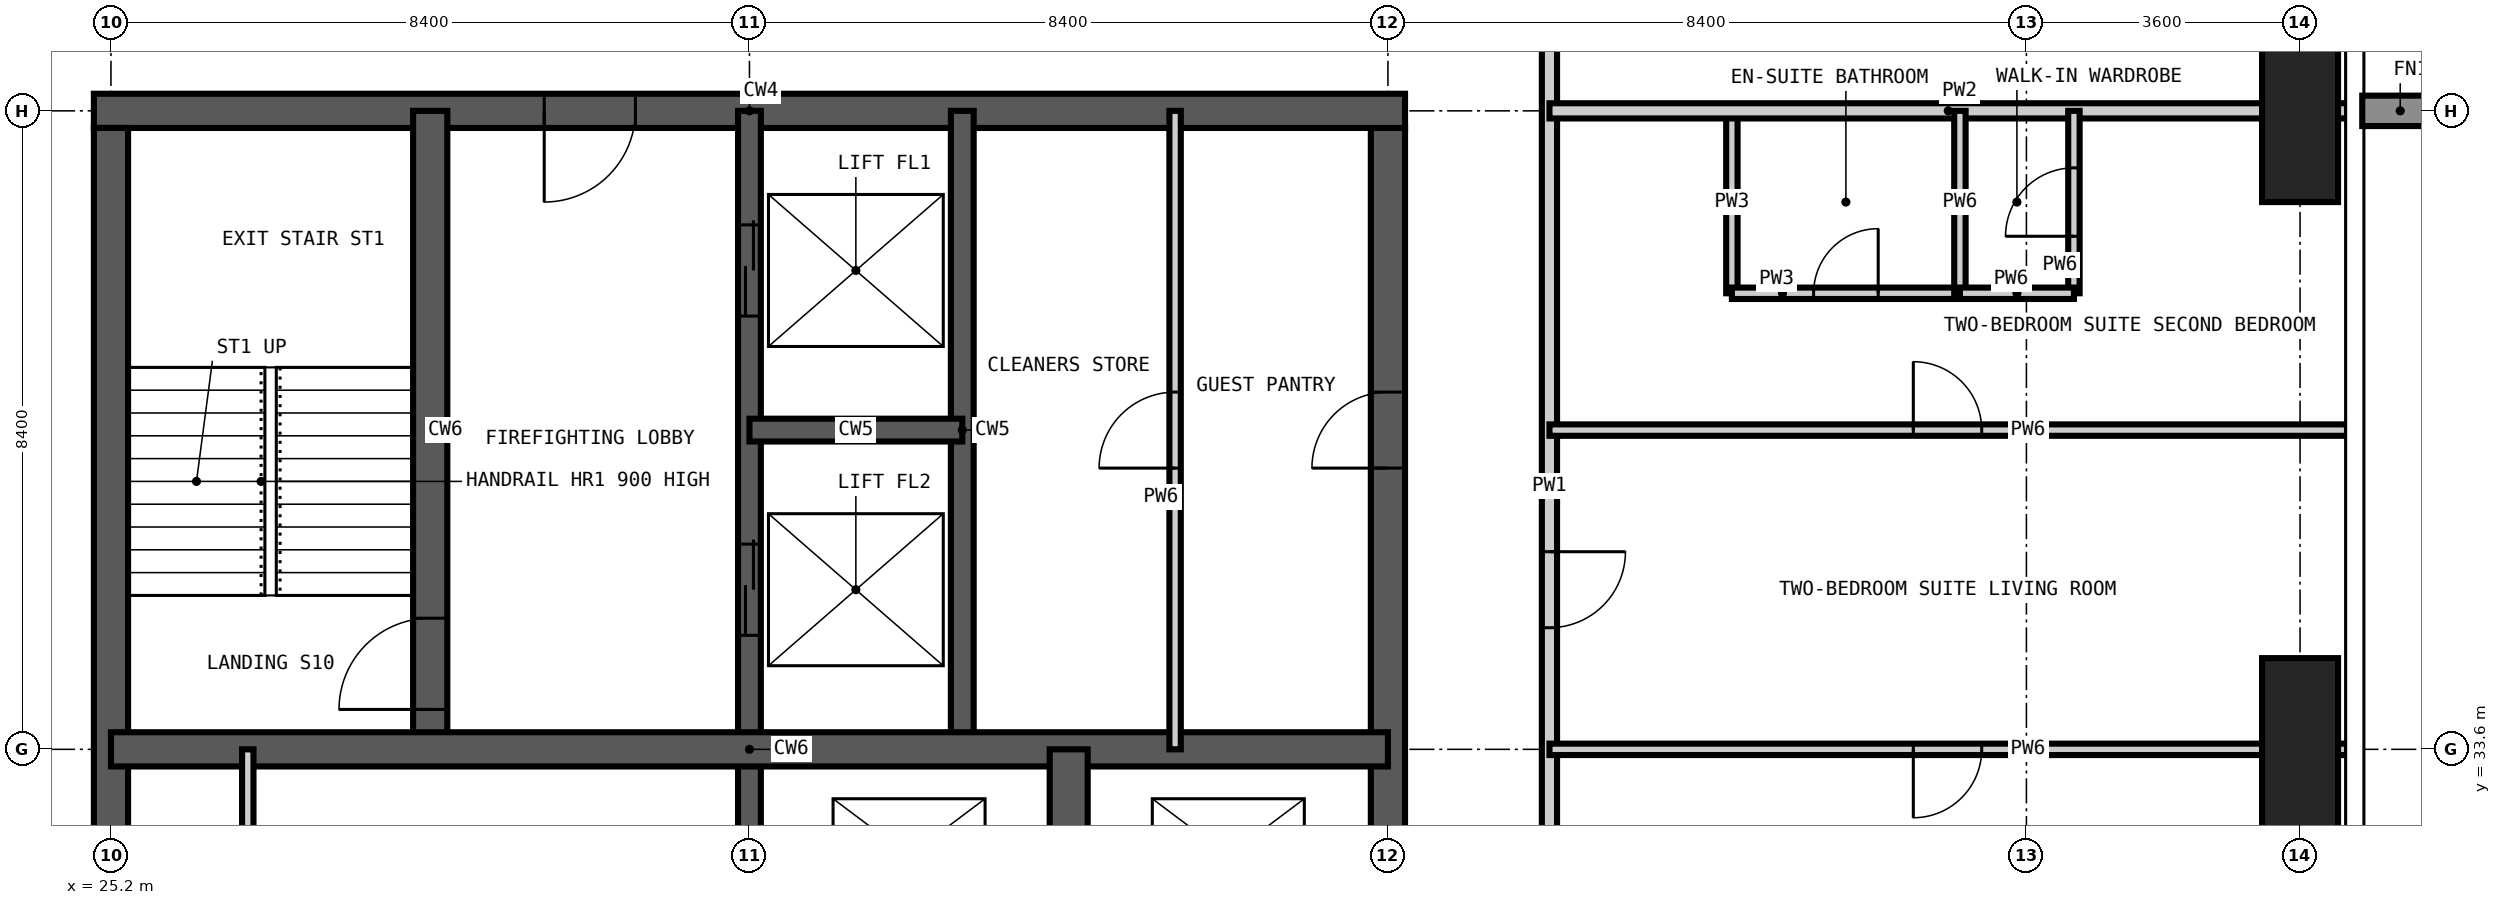
"""IFC4 building model, lengths in metres.
Left out: names, types, materials, properties, quantities, classifications, styles, units other than length and angle.
Written with IfcOpenShell. Run it as: python <this file> out.ifc"""

import sys

from ifc_helpers import new_model, si_unit, direction, frame, frame_2d, origin, origin_2d, place, context, subcontext, project, spatial, rectangle, extrude, element, fill, save


model = new_model("IFC4")
c1 = context("Model", 3, precision=1e-05, world=origin(), true_north=direction((0.0, 1.0)))
c2 = subcontext(c1, "Body", "Model", "MODEL_VIEW")
j1 = project(units=[si_unit("LENGTHUNIT", "METRE"), si_unit("PLANEANGLEUNIT", "RADIAN")], contexts=[c1])
p1 = place(None, origin())
s1 = spatial("IfcSite", under=j1, at=p1, CompositionType="ELEMENT")
p2 = place(p1, origin())
s2 = spatial("IfcBuilding", under=s1, at=p2, CompositionType="ELEMENT")
p3 = place(p2, frame((0.0, 0.0, 276.3)))
s3 = spatial("IfcBuildingStorey", under=s2, at=p3, CompositionType="ELEMENT", Elevation=276.3)
for number, where, z_axis, x_axis in (
    (1, (54.0, 33.6, -0.35), (0.0, 0.0, 1.0), (1.0, 0.0, 0.0)),
    (2, (54.0, 42.0, -0.35), (0.0, 0.0, 1.0), (1.0, 0.0, 0.0)),
):
    element("IfcColumn", number, at=place(p3, frame(where, z_axis=z_axis, x_axis=x_axis)), inside=s3, PredefinedType="COLUMN", context=c2, shape_type="SweptSolid", body=[
        extrude(rectangle(XDim=1.0, YDim=2.4, at=origin_2d()), origin(), (0.0, 0.0, 1.0), 3.9),
    ])
p4 = place(p3, frame((42.0, 17.025, -0.35), z_axis=(0.0, 0.0, 1.0), x_axis=(0.0, 1.0, 0.0)))
e3 = element("IfcWall", 3, at=p4, inside=s3, PredefinedType="SHEAR", context=c2, shape_type="SweptSolid", body=[
    extrude(rectangle(XDim=24.75, YDim=0.45, at=frame_2d((12.375, 0.0))), origin(), (0.0, 0.0, 1.0), 3.9),
])
p5 = place(p4, frame((0.575, 0.0, 0.35)))
e4 = element("IfcOpeningElement", 4, at=p5, cuts=e3, PredefinedType="OPENING", context=c2, shape_type="SweptSolid", body=[
    extrude(rectangle(XDim=1.2, YDim=2.2, at=frame_2d((0.6, 1.1))), frame((0.0, 0.235, 0.0), z_axis=(0.0, -1.0, 0.0), x_axis=(1.0, 0.0, 0.0)), (0.0, 0.0, 1.0), 0.47),
])
p6 = place(p4, frame((11.475, 0.0, 0.35)))
e5 = element("IfcOpeningElement", 5, at=p6, cuts=e3, PredefinedType="OPENING", context=c2, shape_type="SweptSolid", body=[
    extrude(rectangle(XDim=1.8, YDim=2.2, at=frame_2d((0.9, 1.1))), frame((0.0, 0.235, 0.0), z_axis=(0.0, -1.0, 0.0), x_axis=(1.0, 0.0, 0.0)), (0.0, 0.0, 1.0), 0.47),
])
p7 = place(p4, frame((20.275, 0.0, 0.35)))
e6 = element("IfcOpeningElement", 6, at=p7, cuts=e3, PredefinedType="OPENING", context=c2, shape_type="SweptSolid", body=[
    extrude(rectangle(XDim=1.0, YDim=2.1, at=frame_2d((0.5, 1.05))), frame((0.0, 0.235, 0.0), z_axis=(0.0, -1.0, 0.0), x_axis=(1.0, 0.0, 0.0)), (0.0, 0.0, 1.0), 0.47),
])
p8 = place(p3, frame((42.225, 42.0, -0.35), z_axis=(0.0, 0.0, 1.0), x_axis=(-1.0, 0.0, 0.0)))
e7 = element("IfcWall", 7, at=p8, inside=s3, PredefinedType="SHEAR", context=c2, shape_type="SweptSolid", body=[
    extrude(rectangle(XDim=17.25, YDim=0.45, at=frame_2d((8.625, 0.0))), origin(), (0.0, 0.0, 1.0), 3.9),
])
p9 = place(p8, frame((10.125, 0.0, 0.35)))
e8 = element("IfcOpeningElement", 8, at=p9, cuts=e7, PredefinedType="OPENING", context=c2, shape_type="SweptSolid", body=[
    extrude(rectangle(XDim=1.2, YDim=2.2, at=frame_2d((0.6, 1.1))), frame((0.0, 0.235, 0.0), z_axis=(0.0, -1.0, 0.0), x_axis=(1.0, 0.0, 0.0)), (0.0, 0.0, 1.0), 0.47),
])
p10 = place(p3, frame((25.2, 41.775, -0.35), z_axis=(0.0, 0.0, 1.0), x_axis=(0.0, -1.0, 0.0)))
e9 = element("IfcWall", 9, at=p10, inside=s3, PredefinedType="SHEAR", context=c2, shape_type="SweptSolid", body=[
    extrude(rectangle(XDim=24.75, YDim=0.45, at=frame_2d((12.375, 0.0))), origin(), (0.0, 0.0, 1.0), 3.9),
])
p11 = place(p10, frame((11.875, 0.0, 0.35)))
e10 = element("IfcOpeningElement", 10, at=p11, cuts=e9, PredefinedType="OPENING", context=c2, shape_type="SweptSolid", body=[
    extrude(rectangle(XDim=1.0, YDim=2.1, at=frame_2d((0.5, 1.05))), frame((0.0, 0.235, 0.0), z_axis=(0.0, -1.0, 0.0), x_axis=(1.0, 0.0, 0.0)), (0.0, 0.0, 1.0), 0.47),
])
p12 = place(p3, frame((33.6, 16.8, -0.35), z_axis=(0.0, 0.0, 1.0), x_axis=(0.0, 1.0, 0.0)))
e11 = element("IfcWall", 11, at=p12, inside=s3, PredefinedType="SHEAR", context=c2, shape_type="SweptSolid", body=[
    extrude(rectangle(XDim=25.2, YDim=0.3, at=frame_2d((12.6, 0.0))), origin(), (0.0, 0.0, 1.0), 3.9),
])
p13 = place(p12, frame((22.5, 0.0, 0.35)))
e12 = element("IfcOpeningElement", 12, at=p13, cuts=e11, PredefinedType="OPENING", context=c2, shape_type="SweptSolid", body=[
    extrude(rectangle(XDim=1.2, YDim=2.2, at=frame_2d((0.6, 1.1))), frame((0.0, 0.16, 0.0), z_axis=(0.0, -1.0, 0.0), x_axis=(1.0, 0.0, 0.0)), (0.0, 0.0, 1.0), 0.32),
])
p14 = place(p12, frame((18.3, 0.0, 0.35)))
e13 = element("IfcOpeningElement", 13, at=p14, cuts=e11, PredefinedType="OPENING", context=c2, shape_type="SweptSolid", body=[
    extrude(rectangle(XDim=1.2, YDim=2.2, at=frame_2d((0.6, 1.1))), frame((0.0, 0.16, 0.0), z_axis=(0.0, -1.0, 0.0), x_axis=(1.0, 0.0, 0.0)), (0.0, 0.0, 1.0), 0.32),
])
p15 = place(p12, frame((9.3, 0.0, 0.35)))
e14 = element("IfcOpeningElement", 14, at=p15, cuts=e11, PredefinedType="OPENING", context=c2, shape_type="SweptSolid", body=[
    extrude(rectangle(XDim=1.0, YDim=2.1, at=frame_2d((0.5, 1.05))), frame((0.0, 0.16, 0.0), z_axis=(0.0, -1.0, 0.0), x_axis=(1.0, 0.0, 0.0)), (0.0, 0.0, 1.0), 0.32),
])
p16 = place(p3, frame((36.4, 33.6, -0.35), z_axis=(0.0, 0.0, 1.0), x_axis=(0.0, 1.0, 0.0)))
e15 = element("IfcWall", 15, at=p16, inside=s3, PredefinedType="SHEAR", context=c2, shape_type="SweptSolid", body=[
    extrude(rectangle(XDim=8.4, YDim=0.3, at=frame_2d((4.2, 0.0))), origin(), (0.0, 0.0, 1.0), 3.9),
])
p17 = place(p3, frame((33.6, 37.8, -0.35), z_axis=(0.0, 0.0, 1.0), x_axis=(1.0, 0.0, 0.0)))
e16 = element("IfcWall", 16, at=p17, inside=s3, PredefinedType="SHEAR", context=c2, shape_type="SweptSolid", body=[
    extrude(rectangle(XDim=2.8, YDim=0.3, at=frame_2d((1.4, 0.0))), origin(), (0.0, 0.0, 1.0), 3.9),
])
p18 = place(p3, frame((29.4, 33.6, -0.35), z_axis=(0.0, 0.0, 1.0), x_axis=(0.0, 1.0, 0.0)))
e17 = element("IfcWall", 17, at=p18, inside=s3, PredefinedType="SHEAR", context=c2, shape_type="SweptSolid", body=[
    extrude(rectangle(XDim=8.4, YDim=0.45, at=frame_2d((4.2, 0.0))), origin(), (0.0, 0.0, 1.0), 3.9),
])
p19 = place(p18, frame((0.525, 0.0, 0.35)))
e18 = element("IfcOpeningElement", 18, at=p19, cuts=e17, PredefinedType="OPENING", context=c2, shape_type="SweptSolid", body=[
    extrude(rectangle(XDim=1.2, YDim=2.2, at=frame_2d((0.6, 1.1))), frame((0.0, 0.235, 0.0), z_axis=(0.0, -1.0, 0.0), x_axis=(1.0, 0.0, 0.0)), (0.0, 0.0, 1.0), 0.47),
])
p20 = place(p3, frame((25.2, 33.6, -0.35), z_axis=(0.0, 0.0, 1.0), x_axis=(1.0, 0.0, 0.0)))
e19 = element("IfcWall", 19, at=p20, inside=s3, PredefinedType="SHEAR", context=c2, shape_type="SweptSolid", body=[
    extrude(rectangle(XDim=16.8, YDim=0.45, at=frame_2d((8.4, 0.0))), origin(), (0.0, 0.0, 1.0), 3.9),
])
p21 = place(p3, frame((37.8, 30.8, -0.35), z_axis=(0.0, 0.0, 1.0), x_axis=(0.0, 1.0, 0.0)))
e20 = element("IfcWall", 20, at=p21, inside=s3, PredefinedType="SHEAR", context=c2, shape_type="SweptSolid", body=[
    extrude(rectangle(XDim=2.8, YDim=0.5, at=frame_2d((1.4, 0.0))), origin(), (0.0, 0.0, 1.0), 3.9),
])
p22 = place(p3, frame((46.525, 39.6, 0.0), z_axis=(0.0, 0.0, 1.0), x_axis=(0.0, 1.0, 0.0)))
e21 = element("IfcWall", 21, at=p22, inside=s3, PredefinedType="PARTITIONING", context=c2, shape_type="SweptSolid", body=[
    extrude(rectangle(XDim=2.4, YDim=0.15, at=frame_2d((1.2, 0.0))), origin(), (0.0, 0.0, 1.0), 3.55),
])
p23 = place(p3, frame((46.525, 39.6, 0.0), z_axis=(0.0, 0.0, 1.0), x_axis=(1.0, 0.0, 0.0)))
e22 = element("IfcWall", 22, at=p23, inside=s3, PredefinedType="PARTITIONING", context=c2, shape_type="SweptSolid", body=[
    extrude(rectangle(XDim=3.0, YDim=0.15, at=frame_2d((1.5, 0.0))), origin(), (0.0, 0.0, 1.0), 3.55),
])
p24 = place(p23, frame((1.075, 0.0, 0.0)))
e23 = element("IfcOpeningElement", 23, at=p24, cuts=e22, PredefinedType="OPENING", context=c2, shape_type="SweptSolid", body=[
    extrude(rectangle(XDim=0.85, YDim=2.1, at=frame_2d((0.425, 1.05))), frame((0.0, 0.085, 0.0), z_axis=(0.0, -1.0, 0.0), x_axis=(1.0, 0.0, 0.0)), (0.0, 0.0, 1.0), 0.17),
])
p25 = place(p3, frame((44.125, 44.725, 0.0), z_axis=(0.0, 0.0, 1.0), x_axis=(0.0, -1.0, 0.0)))
e24 = element("IfcWall", 24, at=p25, inside=s3, PredefinedType="PARTITIONING", context=c2, shape_type="SweptSolid", body=[
    extrude(rectangle(XDim=15.325, YDim=0.2, at=frame_2d((7.663, 0.0))), origin(), (0.0, 0.0, 1.0), 3.55),
])
p26 = place(p25, frame((8.525, 0.0, 0.0)))
e25 = element("IfcOpeningElement", 25, at=p26, cuts=e24, PredefinedType="OPENING", context=c2, shape_type="SweptSolid", body=[
    extrude(rectangle(XDim=1.0, YDim=2.2, at=frame_2d((0.5, 1.1))), frame((0.0, 0.11, 0.0), z_axis=(0.0, -1.0, 0.0), x_axis=(1.0, 0.0, 0.0)), (0.0, 0.0, 1.0), 0.22),
])
p27 = place(p25, frame((0.863, 0.0, 0.0)))
e26 = element("IfcOpeningElement", 26, at=p27, cuts=e24, PredefinedType="OPENING", context=c2, shape_type="SweptSolid", body=[
    extrude(rectangle(XDim=1.0, YDim=2.2, at=frame_2d((0.5, 1.1))), frame((0.0, 0.11, 0.0), z_axis=(0.0, -1.0, 0.0), x_axis=(1.0, 0.0, 0.0)), (0.0, 0.0, 1.0), 0.22),
])
p28 = place(p3, frame((44.125, 42.0, 0.0), z_axis=(0.0, 0.0, 1.0), x_axis=(1.0, 0.0, 0.0)))
e27 = element("IfcWall", 27, at=p28, inside=s3, PredefinedType="PARTITIONING", context=c2, shape_type="SweptSolid", body=[
    extrude(rectangle(XDim=10.493, YDim=0.2, at=frame_2d((5.247, 0.0))), origin(), (0.0, 0.0, 1.0), 3.55),
])
p29 = place(p3, frame((27.0, 25.2, 0.0), z_axis=(0.0, 0.0, 1.0), x_axis=(0.0, 1.0, 0.0)))
e28 = element("IfcWall", 28, at=p29, inside=s3, PredefinedType="PARTITIONING", context=c2, shape_type="SweptSolid", body=[
    extrude(rectangle(XDim=8.4, YDim=0.15, at=frame_2d((4.2, 0.0))), origin(), (0.0, 0.0, 1.0), 3.55),
])
p30 = place(p29, frame((1.6, 0.0, 0.0)))
e29 = element("IfcOpeningElement", 29, at=p30, cuts=e28, PredefinedType="OPENING", context=c2, shape_type="SweptSolid", body=[
    extrude(rectangle(XDim=1.0, YDim=2.1, at=frame_2d((0.5, 1.05))), frame((0.0, 0.085, 0.0), z_axis=(0.0, -1.0, 0.0), x_axis=(1.0, 0.0, 0.0)), (0.0, 0.0, 1.0), 0.17),
])
p31 = place(p29, frame((5.8, 0.0, 0.0)))
e30 = element("IfcOpeningElement", 30, at=p31, cuts=e28, PredefinedType="OPENING", context=c2, shape_type="SweptSolid", body=[
    extrude(rectangle(XDim=1.0, YDim=2.1, at=frame_2d((0.5, 1.05))), frame((0.0, 0.085, 0.0), z_axis=(0.0, -1.0, 0.0), x_axis=(1.0, 0.0, 0.0)), (0.0, 0.0, 1.0), 0.17),
])
p32 = place(p3, frame((39.2, 33.6, 0.0), z_axis=(0.0, 0.0, 1.0), x_axis=(0.0, 1.0, 0.0)))
e31 = element("IfcWall", 31, at=p32, inside=s3, PredefinedType="PARTITIONING", context=c2, shape_type="SweptSolid", body=[
    extrude(rectangle(XDim=8.4, YDim=0.15, at=frame_2d((4.2, 0.0))), origin(), (0.0, 0.0, 1.0), 3.55),
])
p33 = place(p32, frame((3.7, 0.0, 0.0)))
e32 = element("IfcOpeningElement", 32, at=p33, cuts=e31, PredefinedType="OPENING", context=c2, shape_type="SweptSolid", body=[
    extrude(rectangle(XDim=1.0, YDim=2.1, at=frame_2d((0.5, 1.05))), frame((0.0, 0.085, 0.0), z_axis=(0.0, -1.0, 0.0), x_axis=(1.0, 0.0, 0.0)), (0.0, 0.0, 1.0), 0.17),
])
p34 = place(p3, frame((49.525, 39.6, 0.0), z_axis=(0.0, 0.0, 1.0), x_axis=(0.0, 1.0, 0.0)))
e33 = element("IfcWall", 33, at=p34, inside=s3, PredefinedType="PARTITIONING", context=c2, shape_type="SweptSolid", body=[
    extrude(rectangle(XDim=2.4, YDim=0.15, at=frame_2d((1.2, 0.0))), origin(), (0.0, 0.0, 1.0), 3.55),
])
p35 = place(p3, frame((51.025, 39.6, 0.0), z_axis=(0.0, 0.0, 1.0), x_axis=(0.0, 1.0, 0.0)))
e34 = element("IfcWall", 34, at=p35, inside=s3, PredefinedType="PARTITIONING", context=c2, shape_type="SweptSolid", body=[
    extrude(rectangle(XDim=2.4, YDim=0.15, at=frame_2d((1.2, 0.0))), origin(), (0.0, 0.0, 1.0), 3.55),
])
p36 = place(p35, frame((0.75, 0.0, 0.0)))
e35 = element("IfcOpeningElement", 35, at=p36, cuts=e34, PredefinedType="OPENING", context=c2, shape_type="SweptSolid", body=[
    extrude(rectangle(XDim=0.9, YDim=2.1, at=frame_2d((0.45, 1.05))), frame((0.0, 0.085, 0.0), z_axis=(0.0, -1.0, 0.0), x_axis=(1.0, 0.0, 0.0)), (0.0, 0.0, 1.0), 0.17),
])
p37 = place(p3, frame((44.125, 33.6, 0.0), z_axis=(0.0, 0.0, 1.0), x_axis=(1.0, 0.0, 0.0)))
e36 = element("IfcWall", 36, at=p37, inside=s3, PredefinedType="PARTITIONING", context=c2, shape_type="SweptSolid", body=[
    extrude(rectangle(XDim=10.493, YDim=0.15, at=frame_2d((5.247, 0.0))), origin(), (0.0, 0.0, 1.0), 3.55),
])
p38 = place(p37, frame((4.787, 0.0, 0.0)))
e37 = element("IfcOpeningElement", 37, at=p38, cuts=e36, PredefinedType="OPENING", context=c2, shape_type="SweptSolid", body=[
    extrude(rectangle(XDim=0.9, YDim=2.1, at=frame_2d((0.45, 1.05))), frame((0.0, 0.085, 0.0), z_axis=(0.0, -1.0, 0.0), x_axis=(1.0, 0.0, 0.0)), (0.0, 0.0, 1.0), 0.17),
])
p39 = place(p3, frame((44.125, 37.8, 0.0), z_axis=(0.0, 0.0, 1.0), x_axis=(1.0, 0.0, 0.0)))
e38 = element("IfcWall", 38, at=p39, inside=s3, PredefinedType="PARTITIONING", context=c2, shape_type="SweptSolid", body=[
    extrude(rectangle(XDim=10.493, YDim=0.15, at=frame_2d((5.247, 0.0))), origin(), (0.0, 0.0, 1.0), 3.55),
])
p40 = place(p39, frame((4.787, 0.0, 0.0)))
e39 = element("IfcOpeningElement", 39, at=p40, cuts=e38, PredefinedType="OPENING", context=c2, shape_type="SweptSolid", body=[
    extrude(rectangle(XDim=0.9, YDim=2.1, at=frame_2d((0.45, 1.05))), frame((0.0, 0.085, 0.0), z_axis=(0.0, -1.0, 0.0), x_axis=(1.0, 0.0, 0.0)), (0.0, 0.0, 1.0), 0.17),
])
p41 = place(p3, frame((49.525, 39.6, 0.0), z_axis=(0.0, 0.0, 1.0), x_axis=(1.0, 0.0, 0.0)))
e40 = element("IfcWall", 40, at=p41, inside=s3, PredefinedType="PARTITIONING", context=c2, shape_type="SweptSolid", body=[
    extrude(rectangle(XDim=1.5, YDim=0.15, at=frame_2d((0.75, 0.0))), origin(), (0.0, 0.0, 1.0), 3.55),
])
p42 = place(p19, origin())
e41 = element("IfcDoor", 41, at=p42, inside=s3, OperationType="SINGLE_SWING_LEFT", PredefinedType="DOOR", context=c2, shape_type="SweptSolid", body=[
    extrude(rectangle(XDim=1.2, YDim=2.2, at=frame_2d((0.6, 1.1))), frame((0.0, 0.025, 0.0), z_axis=(0.0, -1.0, 0.0), x_axis=(1.0, 0.0, 0.0)), (0.0, 0.0, 1.0), 0.05),
])
fill(e18, e41)
p43 = place(p13, origin())
e42 = element("IfcDoor", 42, at=p43, inside=s3, OperationType="DOUBLE_DOOR_SLIDING", PredefinedType="DOOR", context=c2, shape_type="SweptSolid", body=[
    extrude(rectangle(XDim=1.2, YDim=2.2, at=frame_2d((0.6, 1.1))), frame((0.0, 0.025, 0.0), z_axis=(0.0, -1.0, 0.0), x_axis=(1.0, 0.0, 0.0)), (0.0, 0.0, 1.0), 0.05),
])
fill(e12, e42)
p44 = place(p14, origin())
e43 = element("IfcDoor", 43, at=p44, inside=s3, OperationType="DOUBLE_DOOR_SLIDING", PredefinedType="DOOR", context=c2, shape_type="SweptSolid", body=[
    extrude(rectangle(XDim=1.2, YDim=2.2, at=frame_2d((0.6, 1.1))), frame((0.0, 0.025, 0.0), z_axis=(0.0, -1.0, 0.0), x_axis=(1.0, 0.0, 0.0)), (0.0, 0.0, 1.0), 0.05),
])
fill(e13, e43)
p45 = place(p26, origin())
e44 = element("IfcDoor", 44, at=p45, inside=s3, OperationType="SINGLE_SWING_LEFT", PredefinedType="DOOR", context=c2, shape_type="SweptSolid", body=[
    extrude(rectangle(XDim=1.0, YDim=2.2, at=frame_2d((0.5, 1.1))), frame((0.0, 0.025, 0.0), z_axis=(0.0, -1.0, 0.0), x_axis=(1.0, 0.0, 0.0)), (0.0, 0.0, 1.0), 0.05),
])
fill(e25, e44)
p46 = place(p38, frame((0.9, 0.0, 0.0), z_axis=(0.0, 0.0, 1.0), x_axis=(-1.0, 0.0, 0.0)))
e45 = element("IfcDoor", 45, at=p46, inside=s3, OperationType="SINGLE_SWING_RIGHT", PredefinedType="DOOR", context=c2, shape_type="SweptSolid", body=[
    extrude(rectangle(XDim=0.9, YDim=2.1, at=frame_2d((0.45, 1.05))), frame((0.0, 0.025, 0.0), z_axis=(0.0, -1.0, 0.0), x_axis=(1.0, 0.0, 0.0)), (0.0, 0.0, 1.0), 0.05),
])
fill(e37, e45)
p47 = place(p40, origin())
e46 = element("IfcDoor", 46, at=p47, inside=s3, OperationType="SINGLE_SWING_LEFT", PredefinedType="DOOR", context=c2, shape_type="SweptSolid", body=[
    extrude(rectangle(XDim=0.9, YDim=2.1, at=frame_2d((0.45, 1.05))), frame((0.0, 0.025, 0.0), z_axis=(0.0, -1.0, 0.0), x_axis=(1.0, 0.0, 0.0)), (0.0, 0.0, 1.0), 0.05),
])
fill(e39, e46)
p48 = place(p24, origin())
e47 = element("IfcDoor", 47, at=p48, inside=s3, OperationType="SINGLE_SWING_RIGHT", PredefinedType="DOOR", context=c2, shape_type="SweptSolid", body=[
    extrude(rectangle(XDim=0.85, YDim=2.1, at=frame_2d((0.425, 1.05))), frame((0.0, 0.025, 0.0), z_axis=(0.0, -1.0, 0.0), x_axis=(1.0, 0.0, 0.0)), (0.0, 0.0, 1.0), 0.05),
])
fill(e23, e47)
p49 = place(p36, origin())
e48 = element("IfcDoor", 48, at=p49, inside=s3, OperationType="SINGLE_SWING_LEFT", PredefinedType="DOOR", context=c2, shape_type="SweptSolid", body=[
    extrude(rectangle(XDim=0.9, YDim=2.1, at=frame_2d((0.45, 1.05))), frame((0.0, 0.025, 0.0), z_axis=(0.0, -1.0, 0.0), x_axis=(1.0, 0.0, 0.0)), (0.0, 0.0, 1.0), 0.05),
])
fill(e35, e48)
p50 = place(p9, origin())
e49 = element("IfcDoor", 49, at=p50, inside=s3, OperationType="SINGLE_SWING_RIGHT", PredefinedType="DOOR", context=c2, shape_type="SweptSolid", body=[
    extrude(rectangle(XDim=1.2, YDim=2.2, at=frame_2d((0.6, 1.1))), frame((0.0, 0.025, 0.0), z_axis=(0.0, -1.0, 0.0), x_axis=(1.0, 0.0, 0.0)), (0.0, 0.0, 1.0), 0.05),
])
fill(e8, e49)
p51 = place(p7, origin())
e50 = element("IfcDoor", 50, at=p51, inside=s3, OperationType="SINGLE_SWING_LEFT", PredefinedType="DOOR", context=c2, shape_type="SweptSolid", body=[
    extrude(rectangle(XDim=1.0, YDim=2.1, at=frame_2d((0.5, 1.05))), frame((0.0, 0.025, 0.0), z_axis=(0.0, -1.0, 0.0), x_axis=(1.0, 0.0, 0.0)), (0.0, 0.0, 1.0), 0.05),
])
fill(e6, e50)
p52 = place(p33, origin())
e51 = element("IfcDoor", 51, at=p52, inside=s3, OperationType="SINGLE_SWING_LEFT", PredefinedType="DOOR", context=c2, shape_type="SweptSolid", body=[
    extrude(rectangle(XDim=1.0, YDim=2.1, at=frame_2d((0.5, 1.05))), frame((0.0, 0.025, 0.0), z_axis=(0.0, -1.0, 0.0), x_axis=(1.0, 0.0, 0.0)), (0.0, 0.0, 1.0), 0.05),
])
fill(e32, e51)
save(model, sys.argv[1])
